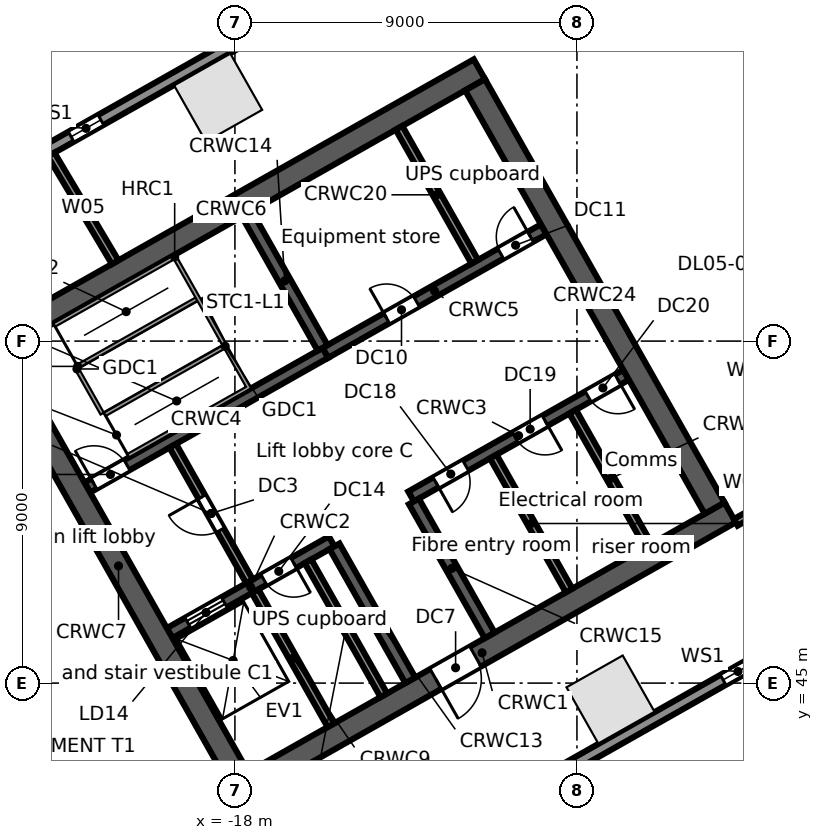
"""IFC4 building model, lengths in metres.
Left out: names, types, materials, properties, quantities, classifications, styles, units other than length and angle.
Written with IfcOpenShell. Run it as: python <this file> out.ifc"""

import sys

from ifc_helpers import new_model, si_unit, direction, frame, frame_2d, origin, origin_2d, place, context, subcontext, project, spatial, rectangle, extrude, element, fill, save


model = new_model("IFC4")
c1 = context("Model", 3, precision=1e-05, world=origin(), true_north=direction((0.0, 1.0)))
c2 = subcontext(c1, "Body", "Model", "MODEL_VIEW")
j1 = project(units=[si_unit("LENGTHUNIT", "METRE"), si_unit("PLANEANGLEUNIT", "RADIAN")], contexts=[c1])
p1 = place(None, origin())
s1 = spatial("IfcSite", under=j1, at=p1, CompositionType="ELEMENT")
p2 = place(p1, origin())
s2 = spatial("IfcBuilding", under=s1, at=p2, CompositionType="ELEMENT")
p3 = place(p2, frame((0.0, 0.0, 31.5)))
s3 = spatial("IfcBuildingStorey", under=s2, at=p3, CompositionType="ELEMENT", Elevation=31.5)
for number, where, z_axis, x_axis in (
    (1, (-18.441, 60.406, 0.0), (0.0, 0.0, 1.0), (-0.87, -0.492, 0.0)),
    (2, (-8.117, 44.568, 0.0), (0.0, 0.0, 1.0), (0.87, 0.492, 0.0)),
):
    element("IfcColumn", number, at=place(p3, frame(where, z_axis=z_axis, x_axis=x_axis)), inside=s3, PredefinedType="COLUMN", context=c2, shape_type="SweptSolid", body=[
        extrude(rectangle(XDim=1.7, YDim=1.7, at=origin_2d()), origin(), (0.0, 0.0, 1.0), 5.0),
    ])
p4 = place(p3, frame((-58.745, 38.764, 0.0), z_axis=(0.0, 0.0, 1.0), x_axis=(0.870355811726, 0.492423355453, 0.0)))
e3 = element("IfcWall", 3, at=p4, inside=s3, PredefinedType="STANDARD", context=c2, shape_type="SweptSolid", body=[
    extrude(rectangle(XDim=64.025, YDim=0.3, at=frame_2d((32.013, 0.0))), origin(), (0.0, 0.0, 1.0), 4.68),
])
p5 = place(p4, frame((60.122, 0.0, 0.6)))
e4 = element("IfcOpeningElement", 4, at=p5, cuts=e3, PredefinedType="OPENING", context=c2, shape_type="SweptSolid", body=[
    extrude(rectangle(XDim=0.9, YDim=3.2, at=frame_2d((0.45, 1.6))), frame((0.0, 0.16, 0.0), z_axis=(0.0, -1.0, 0.0), x_axis=(1.0, 0.0, 0.0)), (0.0, 0.0, 1.0), 0.32),
])
p6 = place(p4, frame((50.992, 0.0, 0.6)))
e5 = element("IfcOpeningElement", 5, at=p6, cuts=e3, PredefinedType="OPENING", context=c2, shape_type="SweptSolid", body=[
    extrude(rectangle(XDim=0.9, YDim=3.2, at=frame_2d((0.45, 1.6))), frame((0.0, 0.16, 0.0), z_axis=(0.0, -1.0, 0.0), x_axis=(1.0, 0.0, 0.0)), (0.0, 0.0, 1.0), 0.32),
])
p7 = place(p4, frame((41.862, 0.0, 0.6)))
e6 = element("IfcOpeningElement", 6, at=p7, cuts=e3, PredefinedType="OPENING", context=c2, shape_type="SweptSolid", body=[
    extrude(rectangle(XDim=0.9, YDim=3.2, at=frame_2d((0.45, 1.6))), frame((0.0, 0.16, 0.0), z_axis=(0.0, -1.0, 0.0), x_axis=(1.0, 0.0, 0.0)), (0.0, 0.0, 1.0), 0.32),
])
p8 = place(p4, frame((32.732, 0.0, 0.6)))
e7 = element("IfcOpeningElement", 7, at=p8, cuts=e3, PredefinedType="OPENING", context=c2, shape_type="SweptSolid", body=[
    extrude(rectangle(XDim=0.9, YDim=3.2, at=frame_2d((0.45, 1.6))), frame((0.0, 0.16, 0.0), z_axis=(0.0, -1.0, 0.0), x_axis=(1.0, 0.0, 0.0)), (0.0, 0.0, 1.0), 0.32),
])
p9 = place(p4, frame((23.602, 0.0, 0.6)))
e8 = element("IfcOpeningElement", 8, at=p9, cuts=e3, PredefinedType="OPENING", context=c2, shape_type="SweptSolid", body=[
    extrude(rectangle(XDim=0.9, YDim=3.2, at=frame_2d((0.45, 1.6))), frame((0.0, 0.16, 0.0), z_axis=(0.0, -1.0, 0.0), x_axis=(1.0, 0.0, 0.0)), (0.0, 0.0, 1.0), 0.32),
])
p10 = place(p4, frame((14.472, 0.0, 0.6)))
e9 = element("IfcOpeningElement", 9, at=p10, cuts=e3, PredefinedType="OPENING", context=c2, shape_type="SweptSolid", body=[
    extrude(rectangle(XDim=0.9, YDim=3.2, at=frame_2d((0.45, 1.6))), frame((0.0, 0.16, 0.0), z_axis=(0.0, -1.0, 0.0), x_axis=(1.0, 0.0, 0.0)), (0.0, 0.0, 1.0), 0.32),
])
p11 = place(p4, frame((5.342, 0.0, 0.6)))
e10 = element("IfcOpeningElement", 10, at=p11, cuts=e3, PredefinedType="OPENING", context=c2, shape_type="SweptSolid", body=[
    extrude(rectangle(XDim=0.9, YDim=3.2, at=frame_2d((0.45, 1.6))), frame((0.0, 0.16, 0.0), z_axis=(0.0, -1.0, 0.0), x_axis=(1.0, 0.0, 0.0)), (0.0, 0.0, 1.0), 0.32),
])
p12 = place(p3, frame((-0.055, 47.969, 0.0), z_axis=(0.0, 0.0, 1.0), x_axis=(-0.870355730478, -0.492423499058, 0.0)))
e11 = element("IfcWall", 11, at=p12, inside=s3, PredefinedType="STANDARD", context=c2, shape_type="SweptSolid", body=[
    extrude(rectangle(XDim=43.75, YDim=0.3, at=frame_2d((21.875, 0.0))), origin(), (0.0, 0.0, 1.0), 4.68),
])
p13 = place(p12, frame((39.977, 0.0, 0.6)))
e12 = element("IfcOpeningElement", 12, at=p13, cuts=e11, PredefinedType="OPENING", context=c2, shape_type="SweptSolid", body=[
    extrude(rectangle(XDim=0.9, YDim=3.2, at=frame_2d((0.45, 1.6))), frame((0.0, 0.16, 0.0), z_axis=(0.0, -1.0, 0.0), x_axis=(1.0, 0.0, 0.0)), (0.0, 0.0, 1.0), 0.32),
])
p14 = place(p12, frame((31.222, 0.0, 0.6)))
e13 = element("IfcOpeningElement", 13, at=p14, cuts=e11, PredefinedType="OPENING", context=c2, shape_type="SweptSolid", body=[
    extrude(rectangle(XDim=0.9, YDim=3.2, at=frame_2d((0.45, 1.6))), frame((0.0, 0.16, 0.0), z_axis=(0.0, -1.0, 0.0), x_axis=(1.0, 0.0, 0.0)), (0.0, 0.0, 1.0), 0.32),
])
p15 = place(p12, frame((22.468, 0.0, 0.6)))
e14 = element("IfcOpeningElement", 14, at=p15, cuts=e11, PredefinedType="OPENING", context=c2, shape_type="SweptSolid", body=[
    extrude(rectangle(XDim=0.9, YDim=3.2, at=frame_2d((0.45, 1.6))), frame((0.0, 0.16, 0.0), z_axis=(0.0, -1.0, 0.0), x_axis=(1.0, 0.0, 0.0)), (0.0, 0.0, 1.0), 0.32),
])
p16 = place(p12, frame((13.713, 0.0, 0.6)))
e15 = element("IfcOpeningElement", 15, at=p16, cuts=e11, PredefinedType="OPENING", context=c2, shape_type="SweptSolid", body=[
    extrude(rectangle(XDim=0.9, YDim=3.2, at=frame_2d((0.45, 1.6))), frame((0.0, 0.16, 0.0), z_axis=(0.0, -1.0, 0.0), x_axis=(1.0, 0.0, 0.0)), (0.0, 0.0, 1.0), 0.32),
])
p17 = place(p12, frame((4.959, 0.0, 0.6)))
e16 = element("IfcOpeningElement", 16, at=p17, cuts=e11, PredefinedType="OPENING", context=c2, shape_type="SweptSolid", body=[
    extrude(rectangle(XDim=0.9, YDim=3.2, at=frame_2d((0.45, 1.6))), frame((0.0, 0.16, 0.0), z_axis=(0.0, -1.0, 0.0), x_axis=(1.0, 0.0, 0.0)), (0.0, 0.0, 1.0), 0.32),
])
p18 = place(p3, frame((-18.024, 42.104, 0.0), z_axis=(0.0, 0.0, 1.0), x_axis=(0.870360574057, 0.492414937962, 0.0)))
e17 = element("IfcWall", 17, at=p18, inside=s3, PredefinedType="SOLIDWALL", context=c2, shape_type="SweptSolid", body=[
    extrude(rectangle(XDim=15.0, YDim=0.6, at=frame_2d((7.5, 0.0))), origin(), (0.0, 0.0, 1.0), 4.68),
])
p19 = place(p18, frame((6.1, 0.0, 0.0)))
e18 = element("IfcOpeningElement", 18, at=p19, cuts=e17, PredefinedType="OPENING", context=c2, shape_type="SweptSolid", body=[
    extrude(rectangle(XDim=1.2, YDim=2.1, at=frame_2d((0.6, 1.05))), frame((0.0, 0.31, 0.0), z_axis=(0.0, -1.0, 0.0), x_axis=(1.0, 0.0, 0.0)), (0.0, 0.0, 1.0), 0.62),
])
p20 = place(p3, frame((-19.718, 46.316, 0.0), z_axis=(0.0, 0.0, 1.0), x_axis=(0.870353963862, 0.492426621528, 0.0)))
e19 = element("IfcWall", 19, at=p20, inside=s3, PredefinedType="SOLIDWALL", context=c2, shape_type="SweptSolid", body=[
    extrude(rectangle(XDim=4.9, YDim=0.3, at=frame_2d((2.45, 0.0))), origin(), (0.0, 0.0, 1.0), 4.68),
])
p21 = place(p20, frame((0.55, 0.0, 0.0)))
e20 = element("IfcOpeningElement", 20, at=p21, cuts=e19, PredefinedType="OPENING", context=c2, shape_type="SweptSolid", body=[
    extrude(rectangle(XDim=1.1, YDim=2.1, at=frame_2d((0.55, 1.05))), frame((0.0, 0.16, 0.0), z_axis=(0.0, -1.0, 0.0), x_axis=(1.0, 0.0, 0.0)), (0.0, 0.0, 1.0), 0.32),
])
p22 = place(p20, frame((2.85, 0.0, 0.0)))
e21 = element("IfcOpeningElement", 21, at=p22, cuts=e19, PredefinedType="OPENING", context=c2, shape_type="SweptSolid", body=[
    extrude(rectangle(XDim=0.9, YDim=2.1, at=frame_2d((0.45, 1.05))), frame((0.0, 0.16, 0.0), z_axis=(0.0, -1.0, 0.0), x_axis=(1.0, 0.0, 0.0)), (0.0, 0.0, 1.0), 0.32),
])
p23 = place(p3, frame((-13.365, 49.911, 0.0), z_axis=(0.0, 0.0, 1.0), x_axis=(0.870340995471, 0.49244954219, 0.0)))
e22 = element("IfcWall", 22, at=p23, inside=s3, PredefinedType="SOLIDWALL", context=c2, shape_type="SweptSolid", body=[
    extrude(rectangle(XDim=6.5, YDim=0.3, at=frame_2d((3.25, 0.0))), origin(), (0.0, 0.0, 1.0), 4.68),
])
p24 = place(p23, frame((0.75, 0.0, 0.0)))
e23 = element("IfcOpeningElement", 23, at=p24, cuts=e22, PredefinedType="OPENING", context=c2, shape_type="SweptSolid", body=[
    extrude(rectangle(XDim=0.9, YDim=2.1, at=frame_2d((0.45, 1.05))), frame((0.0, 0.16, 0.0), z_axis=(0.0, -1.0, 0.0), x_axis=(1.0, 0.0, 0.0)), (0.0, 0.0, 1.0), 0.32),
])
p25 = place(p23, frame((3.15, 0.0, 0.0)))
e24 = element("IfcOpeningElement", 24, at=p25, cuts=e22, PredefinedType="OPENING", context=c2, shape_type="SweptSolid", body=[
    extrude(rectangle(XDim=0.9, YDim=2.1, at=frame_2d((0.45, 1.05))), frame((0.0, 0.16, 0.0), z_axis=(0.0, -1.0, 0.0), x_axis=(1.0, 0.0, 0.0)), (0.0, 0.0, 1.0), 0.32),
])
p26 = place(p23, frame((5.35, 0.0, 0.0)))
e25 = element("IfcOpeningElement", 25, at=p26, cuts=e22, PredefinedType="OPENING", context=c2, shape_type="SweptSolid", body=[
    extrude(rectangle(XDim=0.9, YDim=2.1, at=frame_2d((0.45, 1.05))), frame((0.0, 0.16, 0.0), z_axis=(0.0, -1.0, 0.0), x_axis=(1.0, 0.0, 0.0)), (0.0, 0.0, 1.0), 0.32),
])
p27 = place(p3, frame((-21.885, 50.146, 0.0), z_axis=(0.0, 0.0, 1.0), x_axis=(0.870359411463, 0.492416992881, 0.0)))
e26 = element("IfcWall", 26, at=p27, inside=s3, PredefinedType="SOLIDWALL", context=c2, shape_type="SweptSolid", body=[
    extrude(rectangle(XDim=7.2, YDim=0.3, at=frame_2d((3.6, 0.0))), origin(), (0.0, 0.0, 1.0), 4.68),
])
p28 = place(p27, frame((0.2, 0.0, 0.0)))
e27 = element("IfcOpeningElement", 27, at=p28, cuts=e26, PredefinedType="OPENING", context=c2, shape_type="SweptSolid", body=[
    extrude(rectangle(XDim=1.0, YDim=2.1, at=frame_2d((0.5, 1.05))), frame((0.0, 0.16, 0.0), z_axis=(0.0, -1.0, 0.0), x_axis=(1.0, 0.0, 0.0)), (0.0, 0.0, 1.0), 0.32),
])
p29 = place(p3, frame((-15.618, 53.691, 0.0), z_axis=(0.0, 0.0, 1.0), x_axis=(0.870356769198, 0.492421663121, 0.0)))
e28 = element("IfcWall", 28, at=p29, inside=s3, PredefinedType="SOLIDWALL", context=c2, shape_type="SweptSolid", body=[
    extrude(rectangle(XDim=6.6, YDim=0.3, at=frame_2d((3.3, 0.0))), origin(), (0.0, 0.0, 1.0), 4.68),
])
p30 = place(p29, frame((1.85, 0.0, 0.0)))
e29 = element("IfcOpeningElement", 29, at=p30, cuts=e28, PredefinedType="OPENING", context=c2, shape_type="SweptSolid", body=[
    extrude(rectangle(XDim=0.9, YDim=2.1, at=frame_2d((0.45, 1.05))), frame((0.0, 0.16, 0.0), z_axis=(0.0, -1.0, 0.0), x_axis=(1.0, 0.0, 0.0)), (0.0, 0.0, 1.0), 0.32),
])
p31 = place(p29, frame((5.3, 0.0, 0.0)))
e30 = element("IfcOpeningElement", 30, at=p31, cuts=e28, PredefinedType="OPENING", context=c2, shape_type="SweptSolid", body=[
    extrude(rectangle(XDim=0.9, YDim=2.1, at=frame_2d((0.45, 1.05))), frame((0.0, 0.16, 0.0), z_axis=(0.0, -1.0, 0.0), x_axis=(1.0, 0.0, 0.0)), (0.0, 0.0, 1.0), 0.32),
])
p32 = place(p3, frame((-24.623, 53.767, 0.0), z_axis=(0.0, 0.0, 1.0), x_axis=(0.870356627484, 0.492421913601, 0.0)))
e31 = element("IfcWall", 31, at=p32, inside=s3, PredefinedType="SOLIDWALL", context=c2, shape_type="SweptSolid", body=[
    extrude(rectangle(XDim=15.0, YDim=0.6, at=frame_2d((7.5, 0.0))), origin(), (0.0, 0.0, 1.0), 4.68),
])
p33 = place(p3, frame((-24.214, 53.654, 0.0), z_axis=(0.0, 0.0, 1.0), x_axis=(0.492441221355, -0.870345703448, 0.0)))
e32 = element("IfcWall", 32, at=p33, inside=s3, PredefinedType="SOLIDWALL", context=c2, shape_type="SweptSolid", body=[
    extrude(rectangle(XDim=12.8, YDim=0.6, at=frame_2d((6.4, 0.0))), origin(), (0.0, 0.0, 1.0), 4.68),
])
p34 = place(p3, frame((-17.469, 47.417, 0.0), z_axis=(0.0, 0.0, 1.0), x_axis=(0.492440575896, -0.870346068648, 0.0)))
e33 = element("IfcWall", 33, at=p34, inside=s3, PredefinedType="SOLIDWALL", context=c2, shape_type="SweptSolid", body=[
    extrude(rectangle(XDim=4.05, YDim=0.2, at=frame_2d((2.025, 0.0))), origin(), (0.0, 0.0, 1.0), 4.68),
])
p35 = place(p3, frame((-19.635, 51.246, 0.0), z_axis=(0.0, 0.0, 1.0), x_axis=(0.492408451753, -0.87036424366, 0.0)))
e34 = element("IfcWall", 34, at=p35, inside=s3, PredefinedType="PARTITIONING", context=c2, shape_type="SweptSolid", body=[
    extrude(rectangle(XDim=4.1, YDim=0.2, at=frame_2d((2.05, 0.0))), origin(), (0.0, 0.0, 1.0), 4.68),
])
p36 = place(p35, frame((1.55, 0.0, 0.0)))
e35 = element("IfcOpeningElement", 35, at=p36, cuts=e34, PredefinedType="OPENING", context=c2, shape_type="SweptSolid", body=[
    extrude(rectangle(XDim=1.0, YDim=2.1, at=frame_2d((0.5, 1.05))), frame((0.0, 0.11, 0.0), z_axis=(0.0, -1.0, 0.0), x_axis=(1.0, 0.0, 0.0)), (0.0, 0.0, 1.0), 0.22),
])
p37 = place(p3, frame((-16.076, 48.205, 0.0), z_axis=(0.0, 0.0, 1.0), x_axis=(0.492394910396, -0.870371904542, 0.0)))
e36 = element("IfcWall", 36, at=p37, inside=s3, PredefinedType="SOLIDWALL", context=c2, shape_type="SweptSolid", body=[
    extrude(rectangle(XDim=4.05, YDim=0.2, at=frame_2d((2.025, 0.0))), origin(), (0.0, 0.0, 1.0), 4.68),
])
p38 = place(p3, frame((-15.379, 48.599, 0.0), z_axis=(0.0, 0.0, 1.0), x_axis=(0.492394910396, -0.870371904542, 0.0)))
e37 = element("IfcWall", 37, at=p38, inside=s3, PredefinedType="SOLIDWALL", context=c2, shape_type="SweptSolid", body=[
    extrude(rectangle(XDim=4.05, YDim=0.3, at=frame_2d((2.025, 0.0))), origin(), (0.0, 0.0, 1.0), 4.68),
])
p39 = place(p3, frame((-17.686, 57.347, 0.0), z_axis=(0.0, 0.0, 1.0), x_axis=(0.492420746998, -0.870357287513, 0.0)))
e38 = element("IfcWall", 38, at=p39, inside=s3, PredefinedType="SOLIDWALL", context=c2, shape_type="SweptSolid", body=[
    extrude(rectangle(XDim=4.05, YDim=0.3, at=frame_2d((2.025, 0.0))), origin(), (0.0, 0.0, 1.0), 4.68),
])
p40 = place(p3, frame((-13.291, 49.781, 0.0), z_axis=(0.0, 0.0, 1.0), x_axis=(0.492394910396, -0.870371904542, 0.0)))
e39 = element("IfcWall", 39, at=p40, inside=s3, PredefinedType="SOLIDWALL", context=c2, shape_type="SweptSolid", body=[
    extrude(rectangle(XDim=4.05, YDim=0.3, at=frame_2d((2.025, 0.0))), origin(), (0.0, 0.0, 1.0), 4.68),
])
for number, where, z_axis, x_axis in (
    (40, (-11.202, 50.962, 0.0), (0.0, 0.0, 1.0), (0.492, -0.87, 0.0)),
    (41, (-13.683, 59.612, 0.0), (0.0, 0.0, 1.0), (0.492, -0.87, 0.0)),
):
    element("IfcWall", number, at=place(p3, frame(where, z_axis=z_axis, x_axis=x_axis)), inside=s3, PredefinedType="PARTITIONING", context=c2, shape_type="SweptSolid", body=[
        extrude(rectangle(XDim=4.05, YDim=0.2, at=frame_2d((2.025, 0.0))), origin(), (0.0, 0.0, 1.0), 4.68),
    ])
p41 = place(p3, frame((-9.113, 52.144, 0.0), z_axis=(0.0, 0.0, 1.0), x_axis=(0.492394910396, -0.870371904542, 0.0)))
e42 = element("IfcWall", 42, at=p41, inside=s3, PredefinedType="PARTITIONING", context=c2, shape_type="SweptSolid", body=[
    extrude(rectangle(XDim=4.05, YDim=0.2, at=frame_2d((2.025, 0.0))), origin(), (0.0, 0.0, 1.0), 4.68),
])
p42 = place(p3, frame((-11.681, 60.744, 0.0), z_axis=(0.0, 0.0, 1.0), x_axis=(0.492426772896, -0.870353878221, 0.0)))
e43 = element("IfcWall", 43, at=p42, inside=s3, PredefinedType="SOLIDWALL", context=c2, shape_type="SweptSolid", body=[
    extrude(rectangle(XDim=12.8, YDim=0.6, at=frame_2d((6.4, 0.0))), origin(), (0.0, 0.0, 1.0), 4.68),
])
p43 = place(p3, frame((-22.835, 58.908, 0.0), z_axis=(0.0, 0.0, 1.0), x_axis=(0.511113859879, -0.859513014584, 0.0)))
e44 = element("IfcWall", 44, at=p43, inside=s3, PredefinedType="PARTITIONING", context=c2, shape_type="SweptSolid", body=[
    extrude(rectangle(XDim=3.295, YDim=0.2, at=frame_2d((1.647, 0.0))), origin(), (0.0, 0.0, 1.0), 3.96),
])
p44 = place(p3, frame((-4.821, 49.23, 0.0), z_axis=(0.0, 0.0, 1.0), x_axis=(0.870371217631, 0.492396124598, 0.0)))
e45 = element("IfcWall", 45, at=p44, inside=s3, PredefinedType="PARTITIONING", context=c2, shape_type="SweptSolid", body=[
    extrude(rectangle(XDim=2.659, YDim=0.2, at=frame_2d((1.329, 0.0))), origin(), (0.0, 0.0, 1.0), 4.68),
])
p45 = place(p7, origin())
e46 = element("IfcWindow", 46, at=p45, inside=s3, PartitioningType="SINGLE_PANEL", PredefinedType="WINDOW", context=c2, shape_type="SweptSolid", body=[
    extrude(rectangle(XDim=0.9, YDim=3.2, at=frame_2d((0.45, 1.6))), frame((0.0, 0.03, 0.0), z_axis=(0.0, -1.0, 0.0), x_axis=(1.0, 0.0, 0.0)), (0.0, 0.0, 1.0), 0.06),
])
fill(e6, e46)
p46 = place(p17, origin())
e47 = element("IfcWindow", 47, at=p46, inside=s3, PartitioningType="SINGLE_PANEL", PredefinedType="WINDOW", context=c2, shape_type="SweptSolid", body=[
    extrude(rectangle(XDim=0.9, YDim=3.2, at=frame_2d((0.45, 1.6))), frame((0.0, 0.03, 0.0), z_axis=(0.0, -1.0, 0.0), x_axis=(1.0, 0.0, 0.0)), (0.0, 0.0, 1.0), 0.06),
])
fill(e16, e47)
p47 = place(p21, origin())
e48 = element("IfcDoor", 48, at=p47, inside=s3, OperationType="DOUBLE_DOOR_SLIDING", PredefinedType="DOOR", context=c2, shape_type="SweptSolid", body=[
    extrude(rectangle(XDim=1.1, YDim=2.1, at=frame_2d((0.55, 1.05))), frame((0.0, 0.025, 0.0), z_axis=(0.0, -1.0, 0.0), x_axis=(1.0, 0.0, 0.0)), (0.0, 0.0, 1.0), 0.05),
])
fill(e20, e48)
p48 = place(p28, origin())
e49 = element("IfcDoor", 49, at=p48, inside=s3, OperationType="SINGLE_SWING_LEFT", PredefinedType="DOOR", context=c2, shape_type="SweptSolid", body=[
    extrude(rectangle(XDim=1.0, YDim=2.1, at=frame_2d((0.5, 1.05))), frame((0.0, 0.025, 0.0), z_axis=(0.0, -1.0, 0.0), x_axis=(1.0, 0.0, 0.0)), (0.0, 0.0, 1.0), 0.05),
])
fill(e27, e49)
p49 = place(p36, frame((1.0, 0.0, 0.0), z_axis=(0.0, 0.0, 1.0), x_axis=(-1.0, 0.0, 0.0)))
e50 = element("IfcDoor", 50, at=p49, inside=s3, OperationType="SINGLE_SWING_RIGHT", PredefinedType="DOOR", context=c2, shape_type="SweptSolid", body=[
    extrude(rectangle(XDim=1.0, YDim=2.1, at=frame_2d((0.5, 1.05))), frame((0.0, 0.025, 0.0), z_axis=(0.0, -1.0, 0.0), x_axis=(1.0, 0.0, 0.0)), (0.0, 0.0, 1.0), 0.05),
])
fill(e35, e50)
p50 = place(p19, frame((1.2, 0.0, 0.0), z_axis=(0.0, 0.0, 1.0), x_axis=(-1.0, 0.0, 0.0)))
e51 = element("IfcDoor", 51, at=p50, inside=s3, OperationType="SINGLE_SWING_RIGHT", PredefinedType="DOOR", context=c2, shape_type="SweptSolid", body=[
    extrude(rectangle(XDim=1.2, YDim=2.1, at=frame_2d((0.6, 1.05))), frame((0.0, 0.025, 0.0), z_axis=(0.0, -1.0, 0.0), x_axis=(1.0, 0.0, 0.0)), (0.0, 0.0, 1.0), 0.05),
])
fill(e18, e51)
p51 = place(p30, origin())
e52 = element("IfcDoor", 52, at=p51, inside=s3, OperationType="SINGLE_SWING_LEFT", PredefinedType="DOOR", context=c2, shape_type="SweptSolid", body=[
    extrude(rectangle(XDim=0.9, YDim=2.1, at=frame_2d((0.45, 1.05))), frame((0.0, 0.025, 0.0), z_axis=(0.0, -1.0, 0.0), x_axis=(1.0, 0.0, 0.0)), (0.0, 0.0, 1.0), 0.05),
])
fill(e29, e52)
p52 = place(p31, origin())
e53 = element("IfcDoor", 53, at=p52, inside=s3, OperationType="SINGLE_SWING_RIGHT", PredefinedType="DOOR", context=c2, shape_type="SweptSolid", body=[
    extrude(rectangle(XDim=0.9, YDim=2.1, at=frame_2d((0.45, 1.05))), frame((0.0, 0.025, 0.0), z_axis=(0.0, -1.0, 0.0), x_axis=(1.0, 0.0, 0.0)), (0.0, 0.0, 1.0), 0.05),
])
fill(e30, e53)
p53 = place(p22, frame((0.9, 0.0, 0.0), z_axis=(0.0, 0.0, 1.0), x_axis=(-1.0, 0.0, 0.0)))
e54 = element("IfcDoor", 54, at=p53, inside=s3, OperationType="SINGLE_SWING_LEFT", PredefinedType="DOOR", context=c2, shape_type="SweptSolid", body=[
    extrude(rectangle(XDim=0.9, YDim=2.1, at=frame_2d((0.45, 1.05))), frame((0.0, 0.025, 0.0), z_axis=(0.0, -1.0, 0.0), x_axis=(1.0, 0.0, 0.0)), (0.0, 0.0, 1.0), 0.05),
])
fill(e21, e54)
p54 = place(p24, frame((0.9, 0.0, 0.0), z_axis=(0.0, 0.0, 1.0), x_axis=(-1.0, 0.0, 0.0)))
e55 = element("IfcDoor", 55, at=p54, inside=s3, OperationType="SINGLE_SWING_RIGHT", PredefinedType="DOOR", context=c2, shape_type="SweptSolid", body=[
    extrude(rectangle(XDim=0.9, YDim=2.1, at=frame_2d((0.45, 1.05))), frame((0.0, 0.025, 0.0), z_axis=(0.0, -1.0, 0.0), x_axis=(1.0, 0.0, 0.0)), (0.0, 0.0, 1.0), 0.05),
])
fill(e23, e55)
p55 = place(p25, frame((0.9, 0.0, 0.0), z_axis=(0.0, 0.0, 1.0), x_axis=(-1.0, 0.0, 0.0)))
e56 = element("IfcDoor", 56, at=p55, inside=s3, OperationType="SINGLE_SWING_LEFT", PredefinedType="DOOR", context=c2, shape_type="SweptSolid", body=[
    extrude(rectangle(XDim=0.9, YDim=2.1, at=frame_2d((0.45, 1.05))), frame((0.0, 0.025, 0.0), z_axis=(0.0, -1.0, 0.0), x_axis=(1.0, 0.0, 0.0)), (0.0, 0.0, 1.0), 0.05),
])
fill(e24, e56)
p56 = place(p26, frame((0.9, 0.0, 0.0), z_axis=(0.0, 0.0, 1.0), x_axis=(-1.0, 0.0, 0.0)))
e57 = element("IfcDoor", 57, at=p56, inside=s3, OperationType="SINGLE_SWING_LEFT", PredefinedType="DOOR", context=c2, shape_type="SweptSolid", body=[
    extrude(rectangle(XDim=0.9, YDim=2.1, at=frame_2d((0.45, 1.05))), frame((0.0, 0.025, 0.0), z_axis=(0.0, -1.0, 0.0), x_axis=(1.0, 0.0, 0.0)), (0.0, 0.0, 1.0), 0.05),
])
fill(e25, e57)
save(model, sys.argv[1])
